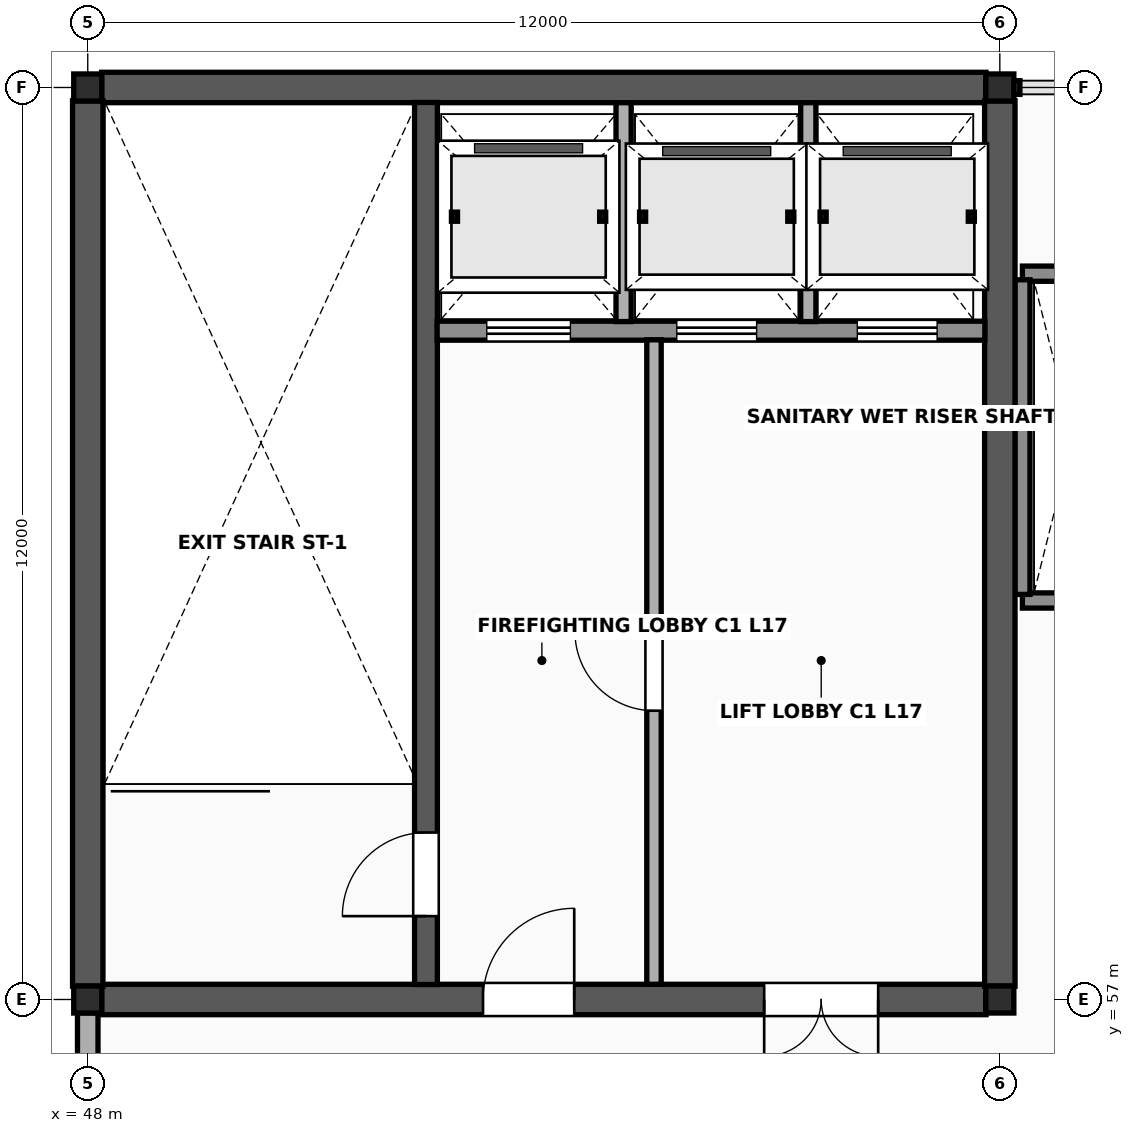
"""IFC4 building model, lengths in metres.
Left out: names, types, materials, properties, quantities, classifications, styles, units other than length and angle.
Written with IfcOpenShell. Run it as: python <this file> out.ifc"""

import sys

from ifc_helpers import new_model, si_unit, direction, frame, frame_2d, origin, origin_2d, place, context, subcontext, project, spatial, rectangle, i_section, extrude, element, fill, save


model = new_model("IFC4")
c1 = context("Model", 3, precision=1e-05, world=origin(), true_north=direction((0.0, 1.0)))
c2 = subcontext(c1, "Body", "Model", "MODEL_VIEW")
j1 = project(units=[si_unit("LENGTHUNIT", "METRE"), si_unit("PLANEANGLEUNIT", "RADIAN")], contexts=[c1])
p1 = place(None, origin())
s1 = spatial("IfcSite", under=j1, at=p1, CompositionType="ELEMENT")
p2 = place(p1, origin())
s2 = spatial("IfcBuilding", under=s1, at=p2, CompositionType="ELEMENT")
p3 = place(p2, frame((0.0, 0.0, 69.6)))
s3 = spatial("IfcBuildingStorey", under=s2, at=p3, CompositionType="ELEMENT", Elevation=69.6)
for number, where, z_axis, x_axis in (
    (1, (48.0, 57.0, 0.0), (0.0, 0.0, 1.0), (1.0, 0.0, 0.0)),
    (2, (48.0, 69.0, 0.0), (0.0, 0.0, 1.0), (1.0, 0.0, 0.0)),
    (3, (60.0, 57.0, 0.0), (0.0, 0.0, 1.0), (1.0, 0.0, 0.0)),
    (4, (60.0, 69.0, 0.0), (0.0, 0.0, 1.0), (1.0, 0.0, 0.0)),
):
    element("IfcColumn", number, at=place(p3, frame(where, z_axis=z_axis, x_axis=x_axis)), inside=s3, PredefinedType="COLUMN", context=c2, shape_type="SweptSolid", body=[
        extrude(i_section(OverallWidth=0.369, OverallDepth=0.356, WebThickness=0.011, FlangeThickness=0.018, FilletRadius=0.018, at=origin_2d()), origin(), (0.0, 0.0, 1.0), 4.6),
    ])
for number, where, z_axis, x_axis in (
    (5, (60.297, 62.25, 0.0), (0.0, 0.0, 1.0), (1.0, 0.0, 0.0)),
    (6, (60.297, 66.55, 0.0), (0.0, 0.0, 1.0), (1.0, 0.0, 0.0)),
):
    element("IfcWall", number, at=place(p3, frame(where, z_axis=z_axis, x_axis=x_axis)), inside=s3, PredefinedType="SOLIDWALL", context=c2, shape_type="SweptSolid", body=[
        extrude(rectangle(XDim=1.283, YDim=0.2, at=frame_2d((0.642, 0.0))), origin(), (0.0, 0.0, 1.0), 4.383),
    ])
p4 = place(p3, frame((60.297, 62.33, 0.0), z_axis=(0.0, 0.0, 1.0), x_axis=(0.0, 1.0, 0.0)))
e7 = element("IfcWall", 7, at=p4, inside=s3, PredefinedType="SOLIDWALL", context=c2, shape_type="SweptSolid", body=[
    extrude(rectangle(XDim=4.14, YDim=0.2, at=frame_2d((2.07, 0.0))), origin(), (0.0, 0.0, 1.0), 4.383),
])
p5 = place(p3, frame((48.181, 57.0, 0.0), z_axis=(0.0, 0.0, 1.0), x_axis=(1.0, 0.0, 0.0)))
e8 = element("IfcWall", 8, at=p5, inside=s3, PredefinedType="SHEAR", context=c2, shape_type="SweptSolid", body=[
    extrude(rectangle(XDim=11.637, YDim=0.4, at=frame_2d((5.819, 0.0))), origin(), (0.0, 0.0, 1.0), 4.383),
])
p6 = place(p5, frame((5.019, 0.0, 0.0)))
e9 = element("IfcOpeningElement", 9, at=p6, cuts=e8, PredefinedType="OPENING", context=c2, shape_type="SweptSolid", body=[
    extrude(rectangle(XDim=1.2, YDim=2.2, at=frame_2d((0.6, 1.1))), frame((0.0, 0.215, 0.0), z_axis=(0.0, -1.0, 0.0), x_axis=(1.0, 0.0, 0.0)), (0.0, 0.0, 1.0), 0.43),
])
p7 = place(p5, frame((8.718, 0.0, 0.0)))
e10 = element("IfcOpeningElement", 10, at=p7, cuts=e8, PredefinedType="OPENING", context=c2, shape_type="SweptSolid", body=[
    extrude(rectangle(XDim=1.5, YDim=2.25, at=frame_2d((0.75, 1.125))), frame((0.0, 0.215, 0.0), z_axis=(0.0, -1.0, 0.0), x_axis=(1.0, 0.0, 0.0)), (0.0, 0.0, 1.0), 0.43),
])
p8 = place(p3, frame((48.181, 69.0, 0.0), z_axis=(0.0, 0.0, 1.0), x_axis=(1.0, 0.0, 0.0)))
e11 = element("IfcWall", 11, at=p8, inside=s3, PredefinedType="SHEAR", context=c2, shape_type="SweptSolid", body=[
    extrude(rectangle(XDim=11.637, YDim=0.4, at=frame_2d((5.819, 0.0))), origin(), (0.0, 0.0, 1.0), 4.383),
])
for number, where, z_axis, x_axis in (
    (12, (48.0, 57.175, 0.0), (0.0, 0.0, 1.0), (0.0, 1.0, 0.0)),
    (13, (60.0, 57.175, 0.0), (0.0, 0.0, 1.0), (0.0, 1.0, 0.0)),
):
    element("IfcWall", number, at=place(p3, frame(where, z_axis=z_axis, x_axis=x_axis)), inside=s3, PredefinedType="SHEAR", context=c2, shape_type="SweptSolid", body=[
        extrude(rectangle(XDim=11.65, YDim=0.4, at=frame_2d((5.825, 0.0))), origin(), (0.0, 0.0, 1.0), 4.383),
    ])
p9 = place(p3, frame((52.45, 57.197, 0.0), z_axis=(0.0, 0.0, 1.0), x_axis=(0.0, 1.0, 0.0)))
e14 = element("IfcWall", 14, at=p9, inside=s3, PredefinedType="SHEAR", context=c2, shape_type="SweptSolid", body=[
    extrude(rectangle(XDim=11.606, YDim=0.3, at=frame_2d((5.803, 0.0))), origin(), (0.0, 0.0, 1.0), 4.383),
])
p10 = place(p9, frame((0.9, 0.0, 0.0)))
e15 = element("IfcOpeningElement", 15, at=p10, cuts=e14, PredefinedType="OPENING", context=c2, shape_type="SweptSolid", body=[
    extrude(rectangle(XDim=1.1, YDim=2.2, at=frame_2d((0.55, 1.1))), frame((0.0, 0.165, 0.0), z_axis=(0.0, -1.0, 0.0), x_axis=(1.0, 0.0, 0.0)), (0.0, 0.0, 1.0), 0.33),
])
p11 = place(p3, frame((52.597, 65.8, 0.0), z_axis=(0.0, 0.0, 1.0), x_axis=(1.0, 0.0, 0.0)))
e16 = element("IfcWall", 16, at=p11, inside=s3, PredefinedType="SOLIDWALL", context=c2, shape_type="SweptSolid", body=[
    extrude(rectangle(XDim=7.206, YDim=0.25, at=frame_2d((3.603, 0.0))), origin(), (0.0, 0.0, 1.0), 4.383),
])
p12 = place(p11, frame((0.653, 0.0, 0.0)))
e17 = element("IfcOpeningElement", 17, at=p12, cuts=e16, PredefinedType="OPENING", context=c2, shape_type="SweptSolid", body=[
    extrude(rectangle(XDim=1.1, YDim=2.24, at=frame_2d((0.55, 1.12))), frame((0.0, 0.14, 0.0), z_axis=(0.0, -1.0, 0.0), x_axis=(1.0, 0.0, 0.0)), (0.0, 0.0, 1.0), 0.28),
])
p13 = place(p11, frame((3.153, 0.0, 0.0)))
e18 = element("IfcOpeningElement", 18, at=p13, cuts=e16, PredefinedType="OPENING", context=c2, shape_type="SweptSolid", body=[
    extrude(rectangle(XDim=1.05, YDim=2.2, at=frame_2d((0.525, 1.1))), frame((0.0, 0.14, 0.0), z_axis=(0.0, -1.0, 0.0), x_axis=(1.0, 0.0, 0.0)), (0.0, 0.0, 1.0), 0.28),
])
p14 = place(p11, frame((5.528, 0.0, 0.0)))
e19 = element("IfcOpeningElement", 19, at=p14, cuts=e16, PredefinedType="OPENING", context=c2, shape_type="SweptSolid", body=[
    extrude(rectangle(XDim=1.05, YDim=2.2, at=frame_2d((0.525, 1.1))), frame((0.0, 0.14, 0.0), z_axis=(0.0, -1.0, 0.0), x_axis=(1.0, 0.0, 0.0)), (0.0, 0.0, 1.0), 0.28),
])
for number, where, z_axis, x_axis in (
    (20, (55.05, 65.92, 0.0), (0.0, 0.0, 1.0), (0.0, 1.0, 0.0)),
    (21, (57.48, 65.92, 0.0), (0.0, 0.0, 1.0), (0.0, 1.0, 0.0)),
):
    element("IfcWall", number, at=place(p3, frame(where, z_axis=z_axis, x_axis=x_axis)), inside=s3, PredefinedType="SOLIDWALL", context=c2, shape_type="SweptSolid", body=[
        extrude(rectangle(XDim=2.88, YDim=0.2, at=frame_2d((1.44, 0.0))), origin(), (0.0, 0.0, 1.0), 4.373),
    ])
p15 = place(p3, frame((55.45, 57.2, 0.0), z_axis=(0.0, 0.0, 1.0), x_axis=(0.0, 1.0, 0.0)))
e22 = element("IfcWall", 22, at=p15, inside=s3, PredefinedType="SOLIDWALL", context=c2, shape_type="SweptSolid", body=[
    extrude(rectangle(XDim=8.48, YDim=0.19, at=frame_2d((4.24, 0.0))), origin(), (0.0, 0.0, 1.0), 4.373),
])
p16 = place(p15, frame((3.6, 0.0, 0.0)))
e23 = element("IfcOpeningElement", 23, at=p16, cuts=e22, PredefinedType="OPENING", context=c2, shape_type="SweptSolid", body=[
    extrude(rectangle(XDim=1.04, YDim=2.18, at=frame_2d((0.52, 1.09))), frame((0.0, 0.11, 0.0), z_axis=(0.0, -1.0, 0.0), x_axis=(1.0, 0.0, 0.0)), (0.0, 0.0, 1.0), 0.22),
])
p17 = place(p3, frame((48.0, 45.176, 0.0), z_axis=(0.0, 0.0, 1.0), x_axis=(0.0, 1.0, 0.0)))
e24 = element("IfcWall", 24, at=p17, inside=s3, PredefinedType="SOLIDWALL", context=c2, shape_type="SweptSolid", body=[
    extrude(rectangle(XDim=11.648, YDim=0.27, at=frame_2d((5.824, 0.0))), origin(), (0.0, 0.0, 1.0), 3.836),
])
p18 = place(p17, frame((4.549, 0.0, 1.4)))
e25 = element("IfcOpeningElement", 25, at=p18, cuts=e24, PredefinedType="OPENING", context=c2, shape_type="SweptSolid", body=[
    extrude(rectangle(XDim=2.55, YDim=0.88, at=frame_2d((1.275, 0.44))), frame((0.0, 0.15, 0.0), z_axis=(0.0, -1.0, 0.0), x_axis=(1.0, 0.0, 0.0)), (0.0, 0.0, 1.0), 0.3),
])
p19 = place(p10, origin())
e26 = element("IfcDoor", 26, at=p19, inside=s3, OperationType="SINGLE_SWING_LEFT", PredefinedType="DOOR", context=c2, shape_type="SweptSolid", body=[
    extrude(rectangle(XDim=1.1, YDim=2.2, at=frame_2d((0.55, 1.1))), frame((0.0, 0.025, 0.0), z_axis=(0.0, -1.0, 0.0), x_axis=(1.0, 0.0, 0.0)), (0.0, 0.0, 1.0), 0.05),
])
fill(e15, e26)
p20 = place(p16, origin())
e27 = element("IfcDoor", 27, at=p20, inside=s3, OperationType="SINGLE_SWING_RIGHT", PredefinedType="DOOR", context=c2, shape_type="SweptSolid", body=[
    extrude(rectangle(XDim=1.04, YDim=2.18, at=frame_2d((0.52, 1.09))), frame((0.0, 0.025, 0.0), z_axis=(0.0, -1.0, 0.0), x_axis=(1.0, 0.0, 0.0)), (0.0, 0.0, 1.0), 0.05),
])
fill(e23, e27)
p21 = place(p6, origin())
e28 = element("IfcDoor", 28, at=p21, inside=s3, OperationType="SINGLE_SWING_RIGHT", PredefinedType="DOOR", context=c2, shape_type="SweptSolid", body=[
    extrude(rectangle(XDim=1.2, YDim=2.2, at=frame_2d((0.6, 1.1))), frame((0.0, 0.025, 0.0), z_axis=(0.0, -1.0, 0.0), x_axis=(1.0, 0.0, 0.0)), (0.0, 0.0, 1.0), 0.05),
])
fill(e9, e28)
p22 = place(p7, origin())
e29 = element("IfcDoor", 29, at=p22, inside=s3, OperationType="DOUBLE_DOOR_SINGLE_SWING", PredefinedType="DOOR", context=c2, shape_type="SweptSolid", body=[
    extrude(rectangle(XDim=1.5, YDim=2.25, at=frame_2d((0.75, 1.125))), frame((0.0, 0.025, 0.0), z_axis=(0.0, -1.0, 0.0), x_axis=(1.0, 0.0, 0.0)), (0.0, 0.0, 1.0), 0.05),
])
fill(e10, e29)
p23 = place(p12, origin())
e30 = element("IfcDoor", 30, at=p23, inside=s3, OperationType="SLIDING_TO_LEFT", PredefinedType="USERDEFINED", context=c2, shape_type="SweptSolid", body=[
    extrude(rectangle(XDim=1.1, YDim=2.24, at=frame_2d((0.55, 1.12))), frame((0.0, 0.025, 0.0), z_axis=(0.0, -1.0, 0.0), x_axis=(1.0, 0.0, 0.0)), (0.0, 0.0, 1.0), 0.05),
])
fill(e17, e30)
p24 = place(p13, origin())
e31 = element("IfcDoor", 31, at=p24, inside=s3, OperationType="SLIDING_TO_LEFT", PredefinedType="USERDEFINED", context=c2, shape_type="SweptSolid", body=[
    extrude(rectangle(XDim=1.05, YDim=2.2, at=frame_2d((0.525, 1.1))), frame((0.0, 0.025, 0.0), z_axis=(0.0, -1.0, 0.0), x_axis=(1.0, 0.0, 0.0)), (0.0, 0.0, 1.0), 0.05),
])
fill(e18, e31)
p25 = place(p14, origin())
e32 = element("IfcDoor", 32, at=p25, inside=s3, OperationType="SLIDING_TO_LEFT", PredefinedType="USERDEFINED", context=c2, shape_type="SweptSolid", body=[
    extrude(rectangle(XDim=1.05, YDim=2.2, at=frame_2d((0.525, 1.1))), frame((0.0, 0.025, 0.0), z_axis=(0.0, -1.0, 0.0), x_axis=(1.0, 0.0, 0.0)), (0.0, 0.0, 1.0), 0.05),
])
fill(e19, e32)
save(model, sys.argv[1])
